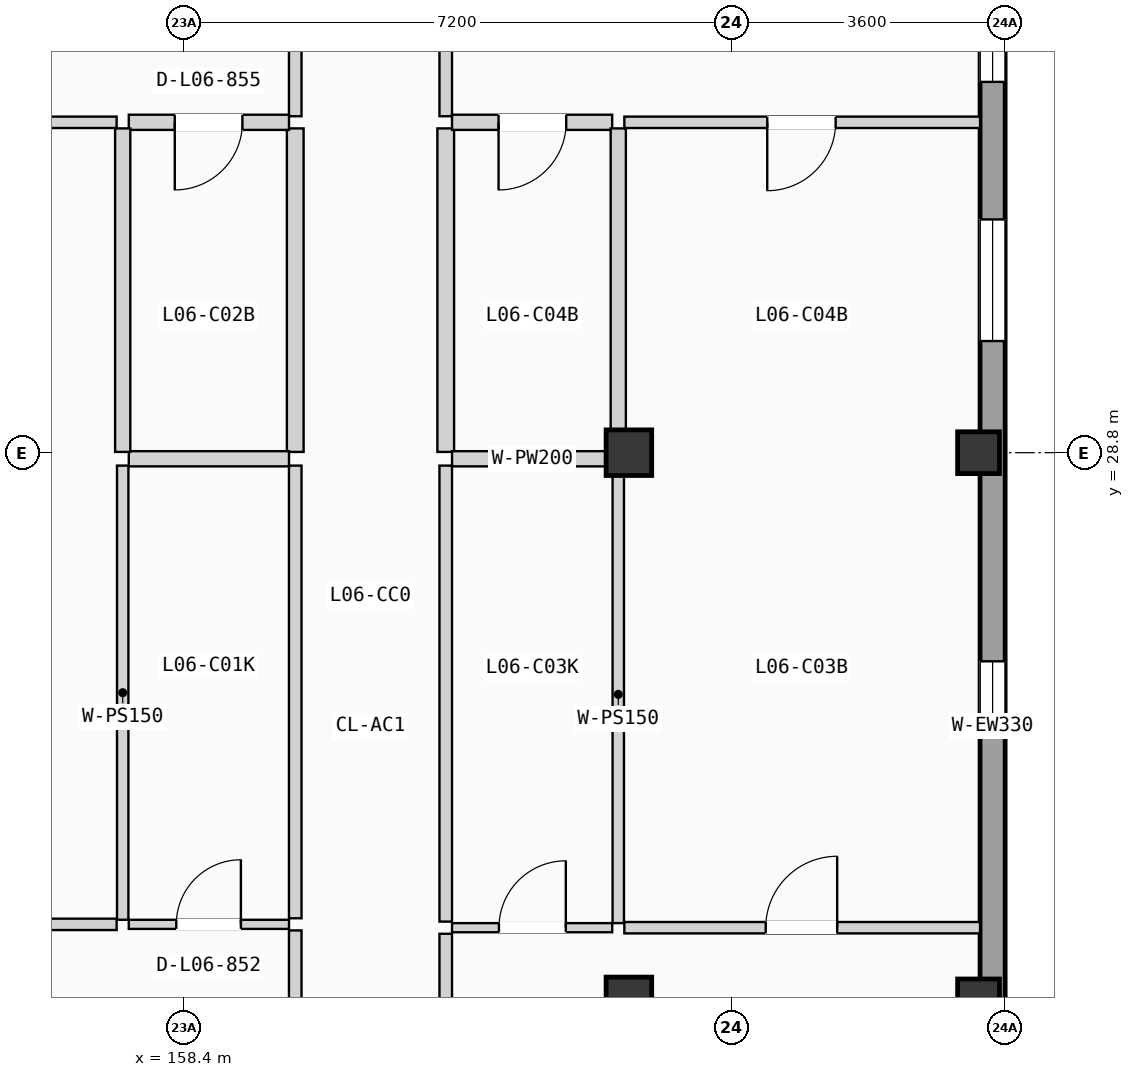
"""IFC4 building model, lengths in metres.
Left out: names, types, materials, properties, quantities, classifications, styles, units other than length and angle.
Written with IfcOpenShell. Run it as: python <this file> out.ifc"""

import sys

from ifc_helpers import new_model, si_unit, direction, frame, frame_2d, origin, origin_2d, place, context, subcontext, project, spatial, rectangle, extrude, element, fill, save


model = new_model("IFC4")
c1 = context("Model", 3, precision=1e-05, world=origin(), true_north=direction((0.0, 1.0)))
c2 = subcontext(c1, "Body", "Model", "MODEL_VIEW")
j1 = project(units=[si_unit("LENGTHUNIT", "METRE"), si_unit("PLANEANGLEUNIT", "RADIAN")], contexts=[c1])
p1 = place(None, origin())
s1 = spatial("IfcSite", under=j1, at=p1, CompositionType="ELEMENT")
p2 = place(p1, origin())
s2 = spatial("IfcBuilding", under=s1, at=p2, CompositionType="ELEMENT")
p3 = place(p2, frame((0.0, 0.0, 21.525)))
s3 = spatial("IfcBuildingStorey", under=s2, at=p3, CompositionType="ELEMENT", Elevation=21.525)
for number, where, z_axis, x_axis in (
    (1, (164.25, 21.6, 0.0), (0.0, 0.0, 1.0), (1.0, 0.0, 0.0)),
    (2, (164.25, 28.8, 0.0), (0.0, 0.0, 1.0), (1.0, 0.0, 0.0)),
):
    element("IfcColumn", number, at=place(p3, frame(where, z_axis=z_axis, x_axis=x_axis)), inside=s3, PredefinedType="COLUMN", context=c2, shape_type="SweptSolid", body=[
        extrude(rectangle(XDim=0.6, YDim=0.6, at=origin_2d()), origin(), (0.0, 0.0, 1.0), 3.15),
    ])
for number, where, z_axis, x_axis in (
    (3, (168.85, 21.6, 0.0), (0.0, 0.0, 1.0), (1.0, 0.0, 0.0)),
    (4, (168.85, 28.8, 0.0), (0.0, 0.0, 1.0), (1.0, 0.0, 0.0)),
):
    element("IfcColumn", number, at=place(p3, frame(where, z_axis=z_axis, x_axis=x_axis)), inside=s3, PredefinedType="COLUMN", context=c2, shape_type="SweptSolid", body=[
        extrude(rectangle(XDim=0.55, YDim=0.55, at=origin_2d()), origin(), (0.0, 0.0, 1.0), 3.15),
    ])
p4 = place(p3, frame((169.035, 0.33, 0.0), z_axis=(0.0, 0.0, 1.0), x_axis=(0.0, 1.0, 0.0)))
e5 = element("IfcWall", 5, at=p4, inside=s3, PredefinedType="SOLIDWALL", context=c2, shape_type="SweptSolid", body=[
    extrude(rectangle(XDim=49.74, YDim=0.33, at=frame_2d((24.87, 0.0))), origin(), (0.0, 0.0, 1.0), 2.89),
])
p5 = place(p4, frame((16.93, 0.0, 0.705)))
e6 = element("IfcOpeningElement", 6, at=p5, cuts=e5, PredefinedType="OPENING", context=c2, shape_type="SweptSolid", body=[
    extrude(rectangle(XDim=1.48, YDim=1.5, at=frame_2d((0.74, 0.75))), frame((0.0, 0.175, 0.0), z_axis=(0.0, -1.0, 0.0), x_axis=(1.0, 0.0, 0.0)), (0.0, 0.0, 1.0), 0.35),
])
p6 = place(p4, frame((9.415, 0.0, 0.555)))
e7 = element("IfcOpeningElement", 7, at=p6, cuts=e5, PredefinedType="OPENING", context=c2, shape_type="SweptSolid", body=[
    extrude(rectangle(XDim=1.48, YDim=1.65, at=frame_2d((0.74, 0.825))), frame((0.0, 0.175, 0.0), z_axis=(0.0, -1.0, 0.0), x_axis=(1.0, 0.0, 0.0)), (0.0, 0.0, 1.0), 0.35),
])
p7 = place(p4, frame((24.775, 0.0, 0.85)))
e8 = element("IfcOpeningElement", 8, at=p7, cuts=e5, PredefinedType="OPENING", context=c2, shape_type="SweptSolid", body=[
    extrude(rectangle(XDim=0.95, YDim=1.2, at=frame_2d((0.475, 0.6))), frame((0.0, 0.175, 0.0), z_axis=(0.0, -1.0, 0.0), x_axis=(1.0, 0.0, 0.0)), (0.0, 0.0, 1.0), 0.35),
])
p8 = place(p4, frame((33.349, 0.0, 0.9)))
e9 = element("IfcOpeningElement", 9, at=p8, cuts=e5, PredefinedType="OPENING", context=c2, shape_type="SweptSolid", body=[
    extrude(rectangle(XDim=1.6, YDim=1.2, at=frame_2d((0.8, 0.6))), frame((0.0, 0.175, 0.0), z_axis=(0.0, -1.0, 0.0), x_axis=(1.0, 0.0, 0.0)), (0.0, 0.0, 1.0), 0.35),
])
p9 = place(p4, frame((29.939, 0.0, 0.855)))
e10 = element("IfcOpeningElement", 10, at=p9, cuts=e5, PredefinedType="OPENING", context=c2, shape_type="SweptSolid", body=[
    extrude(rectangle(XDim=1.6, YDim=1.35, at=frame_2d((0.8, 0.675))), frame((0.0, 0.175, 0.0), z_axis=(0.0, -1.0, 0.0), x_axis=(1.0, 0.0, 0.0)), (0.0, 0.0, 1.0), 0.35),
])
p10 = place(p4, frame((39.541, 0.0, 0.705)))
e11 = element("IfcOpeningElement", 11, at=p10, cuts=e5, PredefinedType="OPENING", context=c2, shape_type="SweptSolid", body=[
    extrude(rectangle(XDim=1.6, YDim=1.5, at=frame_2d((0.8, 0.75))), frame((0.0, 0.175, 0.0), z_axis=(0.0, -1.0, 0.0), x_axis=(1.0, 0.0, 0.0)), (0.0, 0.0, 1.0), 0.35),
])
p11 = place(p3, frame((159.86, 13.53, 0.0), z_axis=(0.0, 0.0, 1.0), x_axis=(0.0, 1.0, 0.0)))
e12 = element("IfcWall", 12, at=p11, inside=s3, PredefinedType="PARTITIONING", context=c2, shape_type="SweptSolid", body=[
    extrude(rectangle(XDim=8.984, YDim=0.165, at=frame_2d((4.492, 0.0))), origin(), (0.0, 0.0, 1.0), 2.87),
])
p12 = place(p11, frame((3.967, 0.0, 0.0)))
e13 = element("IfcOpeningElement", 13, at=p12, cuts=e12, PredefinedType="OPENING", context=c2, shape_type="SweptSolid", body=[
    extrude(rectangle(XDim=1.05, YDim=2.13, at=frame_2d((0.525, 1.065))), frame((0.0, 0.093, 0.0), z_axis=(0.0, -1.0, 0.0), x_axis=(1.0, 0.0, 0.0)), (0.0, 0.0, 1.0), 0.185),
])
p13 = place(p3, frame((159.86, 22.674, 0.0), z_axis=(0.0, 0.0, 1.0), x_axis=(0.0, 1.0, 0.0)))
e14 = element("IfcWall", 14, at=p13, inside=s3, PredefinedType="PARTITIONING", context=c2, shape_type="SweptSolid", body=[
    extrude(rectangle(XDim=5.956, YDim=0.165, at=frame_2d((2.978, 0.0))), origin(), (0.0, 0.0, 1.0), 2.87),
])
p14 = place(p3, frame((159.86, 33.227, 0.0), z_axis=(0.0, 0.0, 1.0), x_axis=(0.0, 1.0, 0.0)))
e15 = element("IfcWall", 15, at=p14, inside=s3, PredefinedType="PARTITIONING", context=c2, shape_type="SweptSolid", body=[
    extrude(rectangle(XDim=5.156, YDim=0.165, at=frame_2d((2.578, 0.0))), origin(), (0.0, 0.0, 1.0), 2.87),
])
p15 = place(p14, frame((2.053, 0.0, 0.0)))
e16 = element("IfcOpeningElement", 16, at=p15, cuts=e15, PredefinedType="OPENING", context=c2, shape_type="SweptSolid", body=[
    extrude(rectangle(XDim=1.05, YDim=2.13, at=frame_2d((0.525, 1.065))), frame((0.0, 0.093, 0.0), z_axis=(0.0, -1.0, 0.0), x_axis=(1.0, 0.0, 0.0)), (0.0, 0.0, 1.0), 0.185),
])
p16 = place(p3, frame((159.86, 28.81, 0.0), z_axis=(0.0, 0.0, 1.0), x_axis=(0.0, 1.0, 0.0)))
e17 = element("IfcWall", 17, at=p16, inside=s3, PredefinedType="PLUMBINGWALL", context=c2, shape_type="SweptSolid", body=[
    extrude(rectangle(XDim=4.257, YDim=0.22, at=frame_2d((2.128, 0.0))), origin(), (0.0, 0.0, 1.0), 2.87),
])
p17 = place(p3, frame((161.84, 13.53, 0.0), z_axis=(0.0, 0.0, 1.0), x_axis=(0.0, 1.0, 0.0)))
e18 = element("IfcWall", 18, at=p17, inside=s3, PredefinedType="PARTITIONING", context=c2, shape_type="SweptSolid", body=[
    extrude(rectangle(XDim=8.94, YDim=0.165, at=frame_2d((4.47, 0.0))), origin(), (0.0, 0.0, 1.0), 2.87),
])
p18 = place(p17, frame((3.945, 0.0, 0.0)))
e19 = element("IfcOpeningElement", 19, at=p18, cuts=e18, PredefinedType="OPENING", context=c2, shape_type="SweptSolid", body=[
    extrude(rectangle(XDim=1.05, YDim=2.13, at=frame_2d((0.525, 1.065))), frame((0.0, 0.093, 0.0), z_axis=(0.0, -1.0, 0.0), x_axis=(1.0, 0.0, 0.0)), (0.0, 0.0, 1.0), 0.185),
])
p19 = place(p3, frame((161.84, 22.63, 0.0), z_axis=(0.0, 0.0, 1.0), x_axis=(0.0, 1.0, 0.0)))
e20 = element("IfcWall", 20, at=p19, inside=s3, PredefinedType="PARTITIONING", context=c2, shape_type="SweptSolid", body=[
    extrude(rectangle(XDim=6.0, YDim=0.165, at=frame_2d((3.0, 0.0))), origin(), (0.0, 0.0, 1.0), 2.87),
])
p20 = place(p3, frame((161.84, 33.227, 0.0), z_axis=(0.0, 0.0, 1.0), x_axis=(0.0, 1.0, 0.0)))
e21 = element("IfcWall", 21, at=p20, inside=s3, PredefinedType="PARTITIONING", context=c2, shape_type="SweptSolid", body=[
    extrude(rectangle(XDim=5.156, YDim=0.165, at=frame_2d((2.578, 0.0))), origin(), (0.0, 0.0, 1.0), 2.87),
])
p21 = place(p20, frame((2.053, 0.0, 0.0)))
e22 = element("IfcOpeningElement", 22, at=p21, cuts=e21, PredefinedType="OPENING", context=c2, shape_type="SweptSolid", body=[
    extrude(rectangle(XDim=1.05, YDim=2.13, at=frame_2d((0.525, 1.065))), frame((0.0, 0.093, 0.0), z_axis=(0.0, -1.0, 0.0), x_axis=(1.0, 0.0, 0.0)), (0.0, 0.0, 1.0), 0.185),
])
p22 = place(p3, frame((161.84, 28.81, 0.0), z_axis=(0.0, 0.0, 1.0), x_axis=(0.0, 1.0, 0.0)))
e23 = element("IfcWall", 23, at=p22, inside=s3, PredefinedType="PLUMBINGWALL", context=c2, shape_type="SweptSolid", body=[
    extrude(rectangle(XDim=4.257, YDim=0.22, at=frame_2d((2.128, 0.0))), origin(), (0.0, 0.0, 1.0), 2.87),
])
p23 = place(p3, frame((157.67, 22.594, 0.0), z_axis=(0.0, 0.0, 1.0), x_axis=(1.0, 0.0, 0.0)))
e24 = element("IfcWall", 24, at=p23, inside=s3, PredefinedType="PARTITIONING", context=c2, shape_type="SweptSolid", body=[
    extrude(rectangle(XDim=2.108, YDim=0.12, at=frame_2d((1.054, 0.0))), origin(), (0.0, 0.0, 1.0), 2.87),
])
p24 = place(p23, frame((0.625, 0.0, 0.0)))
e25 = element("IfcOpeningElement", 25, at=p24, cuts=e24, PredefinedType="OPENING", context=c2, shape_type="SweptSolid", body=[
    extrude(rectangle(XDim=0.85, YDim=2.01, at=frame_2d((0.425, 1.005))), frame((0.0, 0.07, 0.0), z_axis=(0.0, -1.0, 0.0), x_axis=(1.0, 0.0, 0.0)), (0.0, 0.0, 1.0), 0.14),
])
p25 = place(p3, frame((151.53, 22.594, 0.0), z_axis=(0.0, 0.0, 1.0), x_axis=(1.0, 0.0, 0.0)))
e26 = element("IfcWall", 26, at=p25, inside=s3, PredefinedType="PARTITIONING", context=c2, shape_type="SweptSolid", body=[
    extrude(rectangle(XDim=5.98, YDim=0.15, at=frame_2d((2.99, 0.0))), origin(), (0.0, 0.0, 1.0), 2.87),
])
p26 = place(p25, frame((2.53, 0.0, 0.0)))
e27 = element("IfcOpeningElement", 27, at=p26, cuts=e26, PredefinedType="OPENING", context=c2, shape_type="SweptSolid", body=[
    extrude(rectangle(XDim=0.94, YDim=2.06, at=frame_2d((0.47, 1.03))), frame((0.0, 0.085, 0.0), z_axis=(0.0, -1.0, 0.0), x_axis=(1.0, 0.0, 0.0)), (0.0, 0.0, 1.0), 0.17),
])
p27 = place(p3, frame((157.59, 22.654, 0.0), z_axis=(0.0, 0.0, 1.0), x_axis=(0.0, 1.0, 0.0)))
e28 = element("IfcWall", 28, at=p27, inside=s3, PredefinedType="PARTITIONING", context=c2, shape_type="SweptSolid", body=[
    extrude(rectangle(XDim=5.976, YDim=0.15, at=frame_2d((2.988, 0.0))), origin(), (0.0, 0.0, 1.0), 2.87),
])
p28 = place(p3, frame((157.67, 28.72, 0.0), z_axis=(0.0, 0.0, 1.0), x_axis=(1.0, 0.0, 0.0)))
e29 = element("IfcWall", 29, at=p28, inside=s3, PredefinedType="PLUMBINGWALL", context=c2, shape_type="SweptSolid", body=[
    extrude(rectangle(XDim=2.108, YDim=0.2, at=frame_2d((1.054, 0.0))), origin(), (0.0, 0.0, 1.0), 2.16),
])
p29 = place(p3, frame((157.67, 33.147, 0.0), z_axis=(0.0, 0.0, 1.0), x_axis=(1.0, 0.0, 0.0)))
e30 = element("IfcWall", 30, at=p29, inside=s3, PredefinedType="PLUMBINGWALL", context=c2, shape_type="SweptSolid", body=[
    extrude(rectangle(XDim=2.108, YDim=0.2, at=frame_2d((1.054, 0.0))), origin(), (0.0, 0.0, 1.0), 2.87),
])
p30 = place(p29, frame((0.605, 0.0, 0.0)))
e31 = element("IfcOpeningElement", 31, at=p30, cuts=e30, PredefinedType="OPENING", context=c2, shape_type="SweptSolid", body=[
    extrude(rectangle(XDim=0.89, YDim=2.03, at=frame_2d((0.445, 1.015))), frame((0.0, 0.11, 0.0), z_axis=(0.0, -1.0, 0.0), x_axis=(1.0, 0.0, 0.0)), (0.0, 0.0, 1.0), 0.22),
])
p31 = place(p3, frame((151.53, 33.147, 0.0), z_axis=(0.0, 0.0, 1.0), x_axis=(1.0, 0.0, 0.0)))
e32 = element("IfcWall", 32, at=p31, inside=s3, PredefinedType="PARTITIONING", context=c2, shape_type="SweptSolid", body=[
    extrude(rectangle(XDim=5.98, YDim=0.15, at=frame_2d((2.99, 0.0))), origin(), (0.0, 0.0, 1.0), 2.87),
])
p32 = place(p31, frame((2.55, 0.0, 0.0)))
e33 = element("IfcOpeningElement", 33, at=p32, cuts=e32, PredefinedType="OPENING", context=c2, shape_type="SweptSolid", body=[
    extrude(rectangle(XDim=0.9, YDim=2.04, at=frame_2d((0.45, 1.02))), frame((0.0, 0.085, 0.0), z_axis=(0.0, -1.0, 0.0), x_axis=(1.0, 0.0, 0.0)), (0.0, 0.0, 1.0), 0.17),
])
p33 = place(p3, frame((157.59, 28.81, 0.0), z_axis=(0.0, 0.0, 1.0), x_axis=(0.0, 1.0, 0.0)))
e34 = element("IfcWall", 34, at=p33, inside=s3, PredefinedType="PLUMBINGWALL", context=c2, shape_type="SweptSolid", body=[
    extrude(rectangle(XDim=4.257, YDim=0.2, at=frame_2d((2.128, 0.0))), origin(), (0.0, 0.0, 1.0), 2.87),
])
p34 = place(p3, frame((161.923, 22.55, 0.0), z_axis=(0.0, 0.0, 1.0), x_axis=(1.0, 0.0, 0.0)))
e35 = element("IfcWall", 35, at=p34, inside=s3, PredefinedType="PARTITIONING", context=c2, shape_type="SweptSolid", body=[
    extrude(rectangle(XDim=2.107, YDim=0.12, at=frame_2d((1.053, 0.0))), origin(), (0.0, 0.0, 1.0), 2.87),
])
p35 = place(p34, frame((0.617, 0.0, 0.0)))
e36 = element("IfcOpeningElement", 36, at=p35, cuts=e35, PredefinedType="OPENING", context=c2, shape_type="SweptSolid", body=[
    extrude(rectangle(XDim=0.88, YDim=2.02, at=frame_2d((0.44, 1.01))), frame((0.0, 0.07, 0.0), z_axis=(0.0, -1.0, 0.0), x_axis=(1.0, 0.0, 0.0)), (0.0, 0.0, 1.0), 0.14),
])
p36 = place(p3, frame((164.19, 22.55, 0.0), z_axis=(0.0, 0.0, 1.0), x_axis=(1.0, 0.0, 0.0)))
e37 = element("IfcWall", 37, at=p36, inside=s3, PredefinedType="PARTITIONING", context=c2, shape_type="SweptSolid", body=[
    extrude(rectangle(XDim=4.68, YDim=0.15, at=frame_2d((2.34, 0.0))), origin(), (0.0, 0.0, 1.0), 2.87),
])
p37 = place(p36, frame((1.86, 0.0, 0.0)))
e38 = element("IfcOpeningElement", 38, at=p37, cuts=e37, PredefinedType="OPENING", context=c2, shape_type="SweptSolid", body=[
    extrude(rectangle(XDim=0.94, YDim=2.06, at=frame_2d((0.47, 1.03))), frame((0.0, 0.085, 0.0), z_axis=(0.0, -1.0, 0.0), x_axis=(1.0, 0.0, 0.0)), (0.0, 0.0, 1.0), 0.17),
])
p38 = place(p3, frame((164.11, 22.61, 0.0), z_axis=(0.0, 0.0, 1.0), x_axis=(0.0, 1.0, 0.0)))
e39 = element("IfcWall", 39, at=p38, inside=s3, PredefinedType="PARTITIONING", context=c2, shape_type="SweptSolid", body=[
    extrude(rectangle(XDim=6.02, YDim=0.15, at=frame_2d((3.01, 0.0))), origin(), (0.0, 0.0, 1.0), 2.87),
])
p39 = place(p3, frame((161.923, 28.72, 0.0), z_axis=(0.0, 0.0, 1.0), x_axis=(1.0, 0.0, 0.0)))
e40 = element("IfcWall", 40, at=p39, inside=s3, PredefinedType="PLUMBINGWALL", context=c2, shape_type="SweptSolid", body=[
    extrude(rectangle(XDim=2.112, YDim=0.2, at=frame_2d((1.056, 0.0))), origin(), (0.0, 0.0, 1.0), 2.16),
])
p40 = place(p3, frame((161.923, 33.147, 0.0), z_axis=(0.0, 0.0, 1.0), x_axis=(1.0, 0.0, 0.0)))
e41 = element("IfcWall", 41, at=p40, inside=s3, PredefinedType="PLUMBINGWALL", context=c2, shape_type="SweptSolid", body=[
    extrude(rectangle(XDim=2.107, YDim=0.2, at=frame_2d((1.053, 0.0))), origin(), (0.0, 0.0, 1.0), 2.87),
])
p41 = place(p40, frame((0.612, 0.0, 0.0)))
e42 = element("IfcOpeningElement", 42, at=p41, cuts=e41, PredefinedType="OPENING", context=c2, shape_type="SweptSolid", body=[
    extrude(rectangle(XDim=0.89, YDim=2.03, at=frame_2d((0.445, 1.015))), frame((0.0, 0.11, 0.0), z_axis=(0.0, -1.0, 0.0), x_axis=(1.0, 0.0, 0.0)), (0.0, 0.0, 1.0), 0.22),
])
p42 = place(p3, frame((164.19, 33.147, 0.0), z_axis=(0.0, 0.0, 1.0), x_axis=(1.0, 0.0, 0.0)))
e43 = element("IfcWall", 43, at=p42, inside=s3, PredefinedType="PARTITIONING", context=c2, shape_type="SweptSolid", body=[
    extrude(rectangle(XDim=4.68, YDim=0.15, at=frame_2d((2.34, 0.0))), origin(), (0.0, 0.0, 1.0), 2.87),
])
p43 = place(p42, frame((1.88, 0.0, 0.0)))
e44 = element("IfcOpeningElement", 44, at=p43, cuts=e43, PredefinedType="OPENING", context=c2, shape_type="SweptSolid", body=[
    extrude(rectangle(XDim=0.9, YDim=2.04, at=frame_2d((0.45, 1.02))), frame((0.0, 0.085, 0.0), z_axis=(0.0, -1.0, 0.0), x_axis=(1.0, 0.0, 0.0)), (0.0, 0.0, 1.0), 0.17),
])
p44 = place(p3, frame((164.11, 28.81, 0.0), z_axis=(0.0, 0.0, 1.0), x_axis=(0.0, 1.0, 0.0)))
e45 = element("IfcWall", 45, at=p44, inside=s3, PredefinedType="PLUMBINGWALL", context=c2, shape_type="SweptSolid", body=[
    extrude(rectangle(XDim=4.257, YDim=0.2, at=frame_2d((2.128, 0.0))), origin(), (0.0, 0.0, 1.0), 2.87),
])
p45 = place(p7, origin())
e46 = element("IfcWindow", 46, at=p45, inside=s3, PartitioningType="SINGLE_PANEL", PredefinedType="WINDOW", context=c2, shape_type="SweptSolid", body=[
    extrude(rectangle(XDim=0.95, YDim=1.2, at=frame_2d((0.475, 0.6))), frame((0.0, 0.03, 0.0), z_axis=(0.0, -1.0, 0.0), x_axis=(1.0, 0.0, 0.0)), (0.0, 0.0, 1.0), 0.06),
])
fill(e8, e46)
p46 = place(p8, origin())
e47 = element("IfcWindow", 47, at=p46, inside=s3, PartitioningType="DOUBLE_PANEL_VERTICAL", PredefinedType="WINDOW", context=c2, shape_type="SweptSolid", body=[
    extrude(rectangle(XDim=1.6, YDim=1.2, at=frame_2d((0.8, 0.6))), frame((0.0, 0.03, 0.0), z_axis=(0.0, -1.0, 0.0), x_axis=(1.0, 0.0, 0.0)), (0.0, 0.0, 1.0), 0.06),
])
fill(e9, e47)
p47 = place(p9, origin())
e48 = element("IfcWindow", 48, at=p47, inside=s3, PartitioningType="DOUBLE_PANEL_VERTICAL", PredefinedType="WINDOW", context=c2, shape_type="SweptSolid", body=[
    extrude(rectangle(XDim=1.6, YDim=1.35, at=frame_2d((0.8, 0.675))), frame((0.0, 0.03, 0.0), z_axis=(0.0, -1.0, 0.0), x_axis=(1.0, 0.0, 0.0)), (0.0, 0.0, 1.0), 0.06),
])
fill(e10, e48)
p48 = place(p24, origin())
e49 = element("IfcDoor", 49, at=p48, inside=s3, OperationType="SINGLE_SWING_RIGHT", PredefinedType="DOOR", context=c2, shape_type="SweptSolid", body=[
    extrude(rectangle(XDim=0.85, YDim=2.01, at=frame_2d((0.425, 1.005))), frame((0.0, 0.025, 0.0), z_axis=(0.0, -1.0, 0.0), x_axis=(1.0, 0.0, 0.0)), (0.0, 0.0, 1.0), 0.05),
])
fill(e25, e49)
p49 = place(p30, frame((0.89, 0.0, 0.0), z_axis=(0.0, 0.0, 1.0), x_axis=(-1.0, 0.0, 0.0)))
e50 = element("IfcDoor", 50, at=p49, inside=s3, OperationType="SINGLE_SWING_LEFT", PredefinedType="DOOR", context=c2, shape_type="SweptSolid", body=[
    extrude(rectangle(XDim=0.89, YDim=2.03, at=frame_2d((0.445, 1.015))), frame((0.0, 0.025, 0.0), z_axis=(0.0, -1.0, 0.0), x_axis=(1.0, 0.0, 0.0)), (0.0, 0.0, 1.0), 0.05),
])
fill(e31, e50)
p50 = place(p35, origin())
e51 = element("IfcDoor", 51, at=p50, inside=s3, OperationType="SINGLE_SWING_RIGHT", PredefinedType="DOOR", context=c2, shape_type="SweptSolid", body=[
    extrude(rectangle(XDim=0.88, YDim=2.02, at=frame_2d((0.44, 1.01))), frame((0.0, 0.025, 0.0), z_axis=(0.0, -1.0, 0.0), x_axis=(1.0, 0.0, 0.0)), (0.0, 0.0, 1.0), 0.05),
])
fill(e36, e51)
p51 = place(p37, origin())
e52 = element("IfcDoor", 52, at=p51, inside=s3, OperationType="SINGLE_SWING_RIGHT", PredefinedType="DOOR", context=c2, shape_type="SweptSolid", body=[
    extrude(rectangle(XDim=0.94, YDim=2.06, at=frame_2d((0.47, 1.03))), frame((0.0, 0.025, 0.0), z_axis=(0.0, -1.0, 0.0), x_axis=(1.0, 0.0, 0.0)), (0.0, 0.0, 1.0), 0.05),
])
fill(e38, e52)
p52 = place(p41, frame((0.89, 0.0, 0.0), z_axis=(0.0, 0.0, 1.0), x_axis=(-1.0, 0.0, 0.0)))
e53 = element("IfcDoor", 53, at=p52, inside=s3, OperationType="SINGLE_SWING_LEFT", PredefinedType="DOOR", context=c2, shape_type="SweptSolid", body=[
    extrude(rectangle(XDim=0.89, YDim=2.03, at=frame_2d((0.445, 1.015))), frame((0.0, 0.025, 0.0), z_axis=(0.0, -1.0, 0.0), x_axis=(1.0, 0.0, 0.0)), (0.0, 0.0, 1.0), 0.05),
])
fill(e42, e53)
p53 = place(p43, frame((0.9, 0.0, 0.0), z_axis=(0.0, 0.0, 1.0), x_axis=(-1.0, 0.0, 0.0)))
e54 = element("IfcDoor", 54, at=p53, inside=s3, OperationType="SINGLE_SWING_LEFT", PredefinedType="DOOR", context=c2, shape_type="SweptSolid", body=[
    extrude(rectangle(XDim=0.9, YDim=2.04, at=frame_2d((0.45, 1.02))), frame((0.0, 0.025, 0.0), z_axis=(0.0, -1.0, 0.0), x_axis=(1.0, 0.0, 0.0)), (0.0, 0.0, 1.0), 0.05),
])
fill(e44, e54)
save(model, sys.argv[1])
